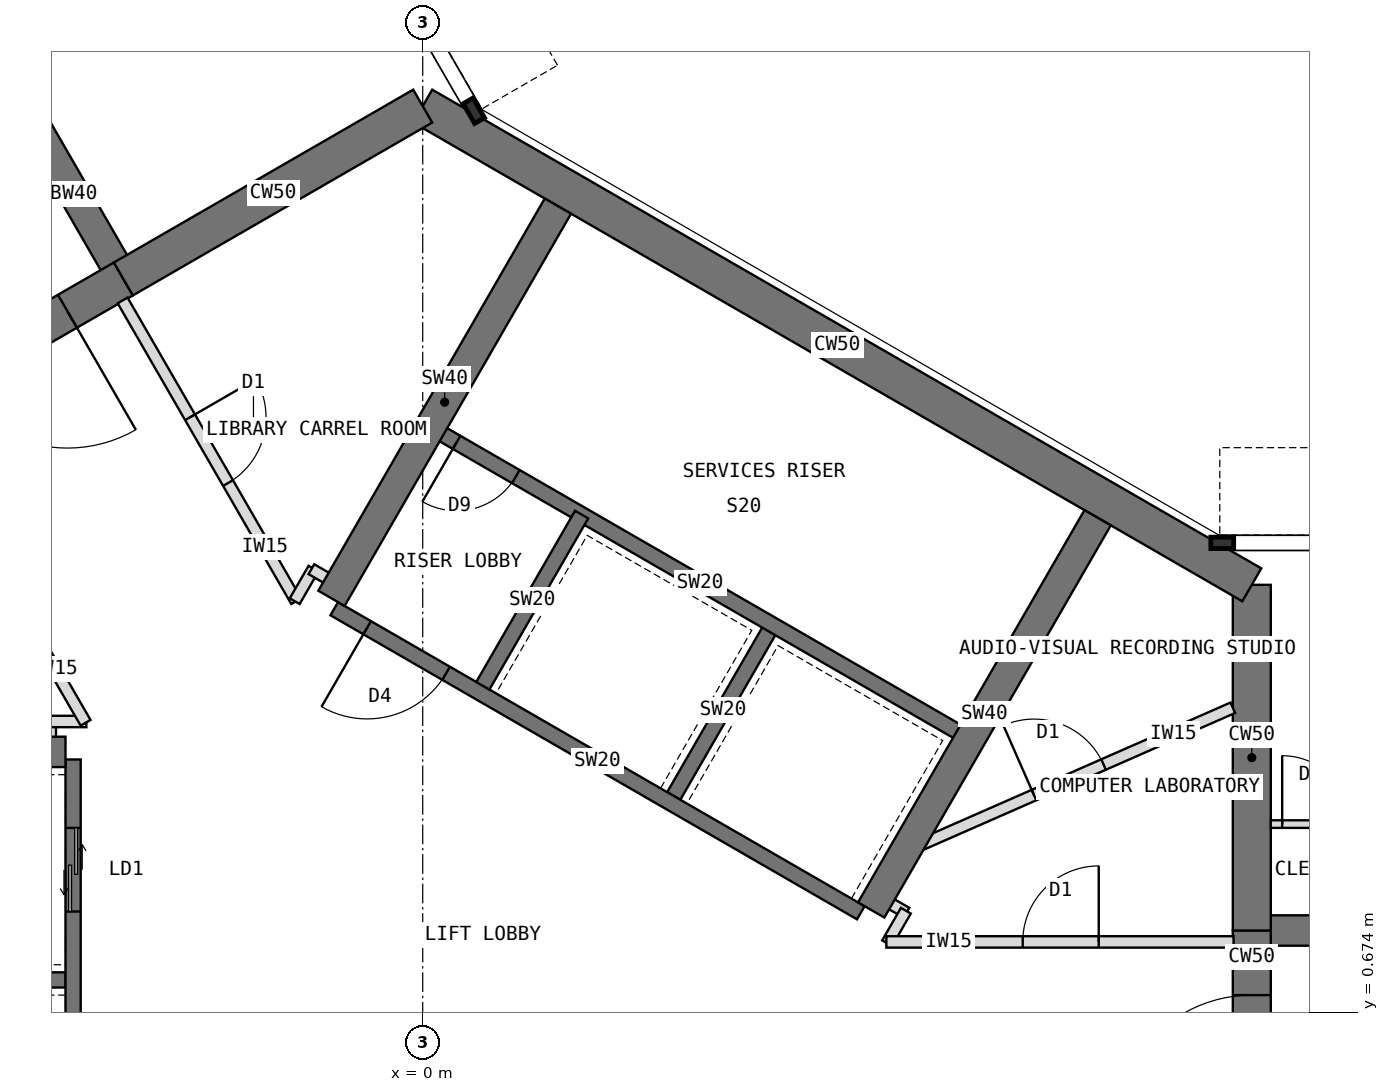
"""IFC4 building model, lengths in metres.
Left out: names, types, materials, properties, quantities, classifications, styles, units other than length and angle.
Written with IfcOpenShell. Run it as: python <this file> out.ifc"""

import sys

from ifc_helpers import new_model, si_unit, direction, frame, frame_2d, origin, place, context, subcontext, project, spatial, rectangle, extrude, element, fill, save


model = new_model("IFC4")
c1 = context("Model", 3, precision=1e-05, world=origin(), true_north=direction((0.0, 1.0)))
c2 = subcontext(c1, "Body", "Model", "MODEL_VIEW")
j1 = project(units=[si_unit("LENGTHUNIT", "METRE"), si_unit("PLANEANGLEUNIT", "RADIAN")], contexts=[c1])
p1 = place(None, origin())
s1 = spatial("IfcSite", under=j1, at=p1, CompositionType="ELEMENT")
p2 = place(p1, origin())
s2 = spatial("IfcBuilding", under=s1, at=p2, CompositionType="ELEMENT")
p3 = place(p2, frame((0.0, 0.0, 218.5)))
s3 = spatial("IfcBuildingStorey", under=s2, at=p3, CompositionType="ELEMENT", Elevation=218.5)
p4 = place(p3, frame((10.908, -1.75, 0.0), z_axis=(0.0, 0.0, 1.0), x_axis=(0.0, 1.0, 0.0)))
e1 = element("IfcWall", 1, at=p4, inside=s3, PredefinedType="SHEAR", context=c2, shape_type="SweptSolid", body=[
    extrude(rectangle(XDim=3.5, YDim=0.5, at=frame_2d((1.75, 0.0))), origin(), (0.0, 0.0, 1.0), 4.0),
])
p5 = place(p4, frame((0.85, 0.0, 0.0)))
e2 = element("IfcOpeningElement", 2, at=p5, cuts=e1, PredefinedType="OPENING", context=c2, shape_type="SweptSolid", body=[
    extrude(rectangle(XDim=1.8, YDim=2.1, at=frame_2d((0.9, 1.05))), frame((0.0, 0.26, 0.0), z_axis=(0.0, -1.0, 0.0), x_axis=(1.0, 0.0, 0.0)), (0.0, 0.0, 1.0), 0.52),
])
p6 = place(p3, frame((10.908, 1.75, 0.0), z_axis=(0.0, 0.0, 1.0), x_axis=(0.0, 1.0, 0.0)))
e3 = element("IfcWall", 3, at=p6, inside=s3, PredefinedType="SHEAR", context=c2, shape_type="SweptSolid", body=[
    extrude(rectangle(XDim=4.548, YDim=0.5, at=frame_2d((2.274, 0.0))), origin(), (0.0, 0.0, 1.0), 4.0),
])
p7 = place(p3, frame((10.908, 6.298, 0.0), z_axis=(0.0, 0.0, 1.0), x_axis=(-0.866021940709, 0.500005998175, 0.0)))
e4 = element("IfcWall", 4, at=p7, inside=s3, PredefinedType="SHEAR", context=c2, shape_type="SweptSolid", body=[
    extrude(rectangle(XDim=12.596, YDim=0.5, at=frame_2d((6.298, 0.0))), origin(), (0.0, 0.0, 1.0), 4.0),
])
p8 = place(p3, frame((0.0, 12.596, 0.0), z_axis=(0.0, 0.0, 1.0), x_axis=(-0.866011268655, -0.500024481964, 0.0)))
e5 = element("IfcWall", 5, at=p8, inside=s3, PredefinedType="SHEAR", context=c2, shape_type="SweptSolid", body=[
    extrude(rectangle(XDim=4.548, YDim=0.5, at=frame_2d((2.274, 0.0))), origin(), (0.0, 0.0, 1.0), 4.0),
])
p9 = place(p3, frame((-3.939, 10.322, 0.0), z_axis=(0.0, 0.0, 1.0), x_axis=(-0.866019471182, -0.500010275428, 0.0)))
e6 = element("IfcWall", 6, at=p9, inside=s3, PredefinedType="SHEAR", context=c2, shape_type="SweptSolid", body=[
    extrude(rectangle(XDim=3.5, YDim=0.5, at=frame_2d((1.75, 0.0))), origin(), (0.0, 0.0, 1.0), 4.0),
])
p10 = place(p9, frame((0.85, 0.0, 0.0)))
e7 = element("IfcOpeningElement", 7, at=p10, cuts=e6, PredefinedType="OPENING", context=c2, shape_type="SweptSolid", body=[
    extrude(rectangle(XDim=1.8, YDim=2.1, at=frame_2d((0.9, 1.05))), frame((0.0, 0.26, 0.0), z_axis=(0.0, -1.0, 0.0), x_axis=(1.0, 0.0, 0.0)), (0.0, 0.0, 1.0), 0.52),
])
p11 = place(p3, frame((10.908, 1.75, 0.0), z_axis=(0.0, 0.0, 1.0), x_axis=(1.0, 0.0, 0.0)))
e8 = element("IfcWall", 8, at=p11, inside=s3, PredefinedType="SHEAR", context=c2, shape_type="SweptSolid", body=[
    extrude(rectangle(XDim=2.592, YDim=0.4, at=frame_2d((1.296, 0.0))), origin(), (0.0, 0.0, 1.0), 4.0),
])
p12 = place(p3, frame((-3.939, 10.322, 0.0), z_axis=(0.0, 0.0, 1.0), x_axis=(-0.499918158782, 0.866072649678, 0.0)))
e9 = element("IfcWall", 9, at=p12, inside=s3, PredefinedType="SHEAR", context=c2, shape_type="SweptSolid", body=[
    extrude(rectangle(XDim=2.592, YDim=0.4, at=frame_2d((1.296, 0.0))), origin(), (0.0, 0.0, 1.0), 4.0),
])
p13 = place(p3, frame((5.764, 1.984, 0.0), z_axis=(0.0, 0.0, 1.0), x_axis=(-0.866026010844, 0.49999894854, 0.0)))
e10 = element("IfcWall", 10, at=p13, inside=s3, PredefinedType="SHEAR", context=c2, shape_type="SweptSolid", body=[
    extrude(rectangle(XDim=8.0, YDim=0.2, at=frame_2d((4.0, 0.0))), origin(), (0.0, 0.0, 1.0), 4.0),
])
p14 = place(p13, frame((6.3, 0.0, 0.0)))
e11 = element("IfcOpeningElement", 11, at=p14, cuts=e10, PredefinedType="OPENING", context=c2, shape_type="SweptSolid", body=[
    extrude(rectangle(XDim=1.2, YDim=2.1, at=frame_2d((0.6, 1.05))), frame((0.0, 0.11, 0.0), z_axis=(0.0, -1.0, 0.0), x_axis=(1.0, 0.0, 0.0)), (0.0, 0.0, 1.0), 0.22),
])
for number, where, z_axis, x_axis in (
    (12, (3.303, 3.52, 0.0), (0.0, 0.0, 1.0), (0.5, 0.866, 0.0)),
    (13, (0.791, 4.97, 0.0), (0.0, 0.0, 1.0), (0.5, 0.866, 0.0)),
):
    element("IfcWall", number, at=place(p3, frame(where, z_axis=z_axis, x_axis=x_axis)), inside=s3, PredefinedType="SHEAR", context=c2, shape_type="SweptSolid", body=[
        extrude(rectangle(XDim=2.6, YDim=0.2, at=frame_2d((1.3, 0.0))), origin(), (0.0, 0.0, 1.0), 4.0),
    ])
p15 = place(p3, frame((7.114, 4.322, 0.0), z_axis=(0.0, 0.0, 1.0), x_axis=(-0.866026010844, 0.49999894854, 0.0)))
e14 = element("IfcWall", 14, at=p15, inside=s3, PredefinedType="SHEAR", context=c2, shape_type="SweptSolid", body=[
    extrude(rectangle(XDim=8.0, YDim=0.2, at=frame_2d((4.0, 0.0))), origin(), (0.0, 0.0, 1.0), 4.0),
])
p16 = place(p15, frame((6.8, 0.0, 0.0)))
e15 = element("IfcOpeningElement", 15, at=p16, cuts=e14, PredefinedType="OPENING", context=c2, shape_type="SweptSolid", body=[
    extrude(rectangle(XDim=0.9, YDim=2.1, at=frame_2d((0.45, 1.05))), frame((0.0, 0.11, 0.0), z_axis=(0.0, -1.0, 0.0), x_axis=(1.0, 0.0, 0.0)), (0.0, 0.0, 1.0), 0.22),
])
p17 = place(p3, frame((-1.201, 6.12, 0.0), z_axis=(0.0, 0.0, 1.0), x_axis=(0.500021575205, 0.866012946976, 0.0)))
e16 = element("IfcWall", 16, at=p17, inside=s3, PredefinedType="SHEAR", context=c2, shape_type="SweptSolid", body=[
    extrude(rectangle(XDim=5.958, YDim=0.4, at=frame_2d((2.979, 0.0))), origin(), (0.0, 0.0, 1.0), 4.0),
])
p18 = place(p3, frame((5.901, 2.02, 0.0), z_axis=(0.0, 0.0, 1.0), x_axis=(0.500003832394, 0.86602319114, 0.0)))
e17 = element("IfcWall", 17, at=p18, inside=s3, PredefinedType="SHEAR", context=c2, shape_type="SweptSolid", body=[
    extrude(rectangle(XDim=5.958, YDim=0.4, at=frame_2d((2.979, 0.0))), origin(), (0.0, 0.0, 1.0), 4.0),
])
p19 = place(p3, frame((-4.6, 4.0, 0.0), z_axis=(0.0, 0.0, 1.0), x_axis=(0.0, -1.0, 0.0)))
e18 = element("IfcWall", 18, at=p19, inside=s3, PredefinedType="SHEAR", context=c2, shape_type="SweptSolid", body=[
    extrude(rectangle(XDim=8.0, YDim=0.2, at=frame_2d((4.0, 0.0))), origin(), (0.0, 0.0, 1.0), 4.0),
])
p20 = place(p19, frame((6.3, 0.0, 0.0)))
e19 = element("IfcOpeningElement", 19, at=p20, cuts=e18, PredefinedType="OPENING", context=c2, shape_type="SweptSolid", body=[
    extrude(rectangle(XDim=1.2, YDim=2.1, at=frame_2d((0.6, 1.05))), frame((0.0, 0.11, 0.0), z_axis=(0.0, -1.0, 0.0), x_axis=(1.0, 0.0, 0.0)), (0.0, 0.0, 1.0), 0.22),
])
p21 = place(p19, frame((0.9, 0.0, 0.0)))
e20 = element("IfcOpeningElement", 20, at=p21, cuts=e18, PredefinedType="OPENING", context=c2, shape_type="SweptSolid", body=[
    extrude(rectangle(XDim=1.1, YDim=2.2, at=frame_2d((0.55, 1.1))), frame((0.0, 0.11, 0.0), z_axis=(0.0, -1.0, 0.0), x_axis=(1.0, 0.0, 0.0)), (0.0, 0.0, 1.0), 0.22),
])
p22 = place(p3, frame((-4.7, 1.1, 0.0), z_axis=(0.0, 0.0, 1.0), x_axis=(-1.0, 0.0, 0.0)))
e21 = element("IfcWall", 21, at=p22, inside=s3, PredefinedType="SHEAR", context=c2, shape_type="SweptSolid", body=[
    extrude(rectangle(XDim=2.6, YDim=0.2, at=frame_2d((1.3, 0.0))), origin(), (0.0, 0.0, 1.0), 4.0),
])
p23 = place(p3, frame((-4.7, 4.1, 0.0), z_axis=(0.0, 0.0, 1.0), x_axis=(-1.0, 0.0, 0.0)))
e22 = element("IfcWall", 22, at=p23, inside=s3, PredefinedType="SHEAR", context=c2, shape_type="SweptSolid", body=[
    extrude(rectangle(XDim=5.958, YDim=0.4, at=frame_2d((2.979, 0.0))), origin(), (0.0, 0.0, 1.0), 4.0),
])
p24 = place(p3, frame((11.158, 3.15, 0.0), z_axis=(0.0, 0.0, 1.0), x_axis=(1.0, 0.0, 0.0)))
e23 = element("IfcWall", 23, at=p24, inside=s3, PredefinedType="PARTITIONING", context=c2, shape_type="SweptSolid", body=[
    extrude(rectangle(XDim=2.4, YDim=0.1, at=frame_2d((1.2, 0.0))), origin(), (0.0, 0.0, 1.0), 3.8),
])
p25 = place(p24, frame((0.15, 0.0, 0.0)))
e24 = element("IfcOpeningElement", 24, at=p25, cuts=e23, PredefinedType="OPENING", context=c2, shape_type="SweptSolid", body=[
    extrude(rectangle(XDim=0.9, YDim=2.1, at=frame_2d((0.45, 1.05))), frame((0.0, 0.06, 0.0), z_axis=(0.0, -1.0, 0.0), x_axis=(1.0, 0.0, 0.0)), (0.0, 0.0, 1.0), 0.12),
])
p26 = place(p3, frame((-4.9, 4.09, 0.0), z_axis=(0.0, 0.0, 1.0), x_axis=(0.0, 1.0, 0.0)))
e25 = element("IfcWall", 25, at=p26, inside=s3, PredefinedType="PARTITIONING", context=c2, shape_type="SweptSolid", body=[
    extrude(rectangle(XDim=0.43, YDim=0.15, at=frame_2d((0.215, 0.0))), origin(), (0.0, 0.0, 1.0), 3.8),
])
p27 = place(p3, frame((-4.92, 4.5, 0.0), z_axis=(0.0, 0.0, 1.0), x_axis=(1.0, 0.0, 0.0)))
e26 = element("IfcWall", 26, at=p27, inside=s3, PredefinedType="PARTITIONING", context=c2, shape_type="SweptSolid", body=[
    extrude(rectangle(XDim=0.494, YDim=0.15, at=frame_2d((0.247, 0.0))), origin(), (0.0, 0.0, 1.0), 3.8),
])
p28 = place(p3, frame((-4.436, 4.483, 0.0), z_axis=(0.0, 0.0, 1.0), x_axis=(-0.500001558674, 0.866024503882, 0.0)))
e27 = element("IfcWall", 27, at=p28, inside=s3, PredefinedType="PARTITIONING", context=c2, shape_type="SweptSolid", body=[
    extrude(rectangle(XDim=4.568, YDim=0.15, at=frame_2d((2.284, 0.0))), origin(), (0.0, 0.0, 1.0), 3.8),
])
p29 = place(p28, frame((1.794, 0.0, 0.0)))
e28 = element("IfcOpeningElement", 28, at=p29, cuts=e27, PredefinedType="OPENING", context=c2, shape_type="SweptSolid", body=[
    extrude(rectangle(XDim=1.0, YDim=2.1, at=frame_2d((0.5, 1.05))), frame((0.0, 0.085, 0.0), z_axis=(0.0, -1.0, 0.0), x_axis=(1.0, 0.0, 0.0)), (0.0, 0.0, 1.0), 0.17),
])
p30 = place(p3, frame((-3.948, 10.039, 0.0), z_axis=(0.0, 0.0, 1.0), x_axis=(0.500001558674, -0.866024503882, 0.0)))
e29 = element("IfcWall", 29, at=p30, inside=s3, PredefinedType="PARTITIONING", context=c2, shape_type="SweptSolid", body=[
    extrude(rectangle(XDim=4.568, YDim=0.15, at=frame_2d((2.284, 0.0))), origin(), (0.0, 0.0, 1.0), 3.8),
])
p31 = place(p30, frame((1.774, 0.0, 0.0)))
e30 = element("IfcOpeningElement", 30, at=p31, cuts=e29, PredefinedType="OPENING", context=c2, shape_type="SweptSolid", body=[
    extrude(rectangle(XDim=1.0, YDim=2.1, at=frame_2d((0.5, 1.05))), frame((0.0, 0.085, 0.0), z_axis=(0.0, -1.0, 0.0), x_axis=(1.0, 0.0, 0.0)), (0.0, 0.0, 1.0), 0.17),
])
p32 = place(p3, frame((-1.684, 6.083, 0.0), z_axis=(0.0, 0.0, 1.0), x_axis=(0.50033519877, 0.865831790172, 0.0)))
e31 = element("IfcWall", 31, at=p32, inside=s3, PredefinedType="PARTITIONING", context=c2, shape_type="SweptSolid", body=[
    extrude(rectangle(XDim=0.494, YDim=0.15, at=frame_2d((0.247, 0.0))), origin(), (0.0, 0.0, 1.0), 3.8),
])
for number, where, z_axis, x_axis in (
    (32, (-1.464, 6.503, 0.0), (0.0, 0.0, 1.0), (0.866, -0.5, 0.0)),
    (33, (5.992, 2.198, 0.0), (0.0, 0.0, 1.0), (0.866, -0.5, 0.0)),
):
    element("IfcWall", number, at=place(p3, frame(where, z_axis=z_axis, x_axis=x_axis)), inside=s3, PredefinedType="PARTITIONING", context=c2, shape_type="SweptSolid", body=[
        extrude(rectangle(XDim=0.43, YDim=0.15, at=frame_2d((0.215, 0.0))), origin(), (0.0, 0.0, 1.0), 3.8),
    ])
p33 = place(p3, frame((6.357, 2.011, 0.0), z_axis=(0.0, 0.0, 1.0), x_axis=(-0.50033519877, -0.865831790172, 0.0)))
e34 = element("IfcWall", 34, at=p33, inside=s3, PredefinedType="PARTITIONING", context=c2, shape_type="SweptSolid", body=[
    extrude(rectangle(XDim=0.494, YDim=0.15, at=frame_2d((0.247, 0.0))), origin(), (0.0, 0.0, 1.0), 3.8),
])
p34 = place(p3, frame((6.1, 1.6, 0.0), z_axis=(0.0, 0.0, 1.0), x_axis=(1.0, 0.0, 0.0)))
e35 = element("IfcWall", 35, at=p34, inside=s3, PredefinedType="PARTITIONING", context=c2, shape_type="SweptSolid", body=[
    extrude(rectangle(XDim=4.568, YDim=0.15, at=frame_2d((2.284, 0.0))), origin(), (0.0, 0.0, 1.0), 3.8),
])
p35 = place(p34, frame((1.794, 0.0, 0.0)))
e36 = element("IfcOpeningElement", 36, at=p35, cuts=e35, PredefinedType="OPENING", context=c2, shape_type="SweptSolid", body=[
    extrude(rectangle(XDim=1.0, YDim=2.1, at=frame_2d((0.5, 1.05))), frame((0.0, 0.085, 0.0), z_axis=(0.0, -1.0, 0.0), x_axis=(1.0, 0.0, 0.0)), (0.0, 0.0, 1.0), 0.17),
])
p36 = place(p3, frame((6.342, 2.785, 0.0), z_axis=(0.0, 0.0, 1.0), x_axis=(0.915607292951, 0.402073730919, 0.0)))
e37 = element("IfcWall", 37, at=p36, inside=s3, PredefinedType="PARTITIONING", context=c2, shape_type="SweptSolid", body=[
    extrude(rectangle(XDim=4.714, YDim=0.15, at=frame_2d((2.357, 0.0))), origin(), (0.0, 0.0, 1.0), 3.8),
])
p37 = place(p36, frame((1.857, 0.0, 0.0)))
e38 = element("IfcOpeningElement", 38, at=p37, cuts=e37, PredefinedType="OPENING", context=c2, shape_type="SweptSolid", body=[
    extrude(rectangle(XDim=1.0, YDim=2.1, at=frame_2d((0.5, 1.05))), frame((0.0, 0.085, 0.0), z_axis=(0.0, -1.0, 0.0), x_axis=(1.0, 0.0, 0.0)), (0.0, 0.0, 1.0), 0.17),
])
p38 = place(p14, origin())
e39 = element("IfcDoor", 39, at=p38, inside=s3, OperationType="SINGLE_SWING_RIGHT", PredefinedType="DOOR", context=c2, shape_type="SweptSolid", body=[
    extrude(rectangle(XDim=1.2, YDim=2.1, at=frame_2d((0.6, 1.05))), frame((0.0, 0.025, 0.0), z_axis=(0.0, -1.0, 0.0), x_axis=(1.0, 0.0, 0.0)), (0.0, 0.0, 1.0), 0.05),
])
fill(e11, e39)
p39 = place(p16, origin())
e40 = element("IfcDoor", 40, at=p39, inside=s3, OperationType="SINGLE_SWING_RIGHT", PredefinedType="DOOR", context=c2, shape_type="SweptSolid", body=[
    extrude(rectangle(XDim=0.9, YDim=2.1, at=frame_2d((0.45, 1.05))), frame((0.0, 0.025, 0.0), z_axis=(0.0, -1.0, 0.0), x_axis=(1.0, 0.0, 0.0)), (0.0, 0.0, 1.0), 0.05),
])
fill(e15, e40)
p40 = place(p21, origin())
e41 = element("IfcDoor", 41, at=p40, inside=s3, OperationType="DOUBLE_DOOR_SLIDING", PredefinedType="DOOR", context=c2, shape_type="SweptSolid", body=[
    extrude(rectangle(XDim=1.1, YDim=2.2, at=frame_2d((0.55, 1.1))), frame((0.0, 0.025, 0.0), z_axis=(0.0, -1.0, 0.0), x_axis=(1.0, 0.0, 0.0)), (0.0, 0.0, 1.0), 0.05),
])
fill(e20, e41)
p41 = place(p5, origin())
e42 = element("IfcDoor", 42, at=p41, inside=s3, OperationType="DOUBLE_DOOR_DOUBLE_SWING", PredefinedType="DOOR", context=c2, shape_type="SweptSolid", body=[
    extrude(rectangle(XDim=1.8, YDim=2.1, at=frame_2d((0.9, 1.05))), frame((0.0, 0.025, 0.0), z_axis=(0.0, -1.0, 0.0), x_axis=(1.0, 0.0, 0.0)), (0.0, 0.0, 1.0), 0.05),
])
fill(e2, e42)
p42 = place(p10, origin())
e43 = element("IfcDoor", 43, at=p42, inside=s3, OperationType="DOUBLE_DOOR_DOUBLE_SWING", PredefinedType="DOOR", context=c2, shape_type="SweptSolid", body=[
    extrude(rectangle(XDim=1.8, YDim=2.1, at=frame_2d((0.9, 1.05))), frame((0.0, 0.025, 0.0), z_axis=(0.0, -1.0, 0.0), x_axis=(1.0, 0.0, 0.0)), (0.0, 0.0, 1.0), 0.05),
])
fill(e7, e43)
p43 = place(p25, origin())
e44 = element("IfcDoor", 44, at=p43, inside=s3, OperationType="SINGLE_SWING_LEFT", PredefinedType="DOOR", context=c2, shape_type="SweptSolid", body=[
    extrude(rectangle(XDim=0.9, YDim=2.1, at=frame_2d((0.45, 1.05))), frame((0.0, 0.025, 0.0), z_axis=(0.0, -1.0, 0.0), x_axis=(1.0, 0.0, 0.0)), (0.0, 0.0, 1.0), 0.05),
])
fill(e24, e44)
p44 = place(p35, origin())
e45 = element("IfcDoor", 45, at=p44, inside=s3, OperationType="SINGLE_SWING_RIGHT", PredefinedType="DOOR", context=c2, shape_type="SweptSolid", body=[
    extrude(rectangle(XDim=1.0, YDim=2.1, at=frame_2d((0.5, 1.05))), frame((0.0, 0.025, 0.0), z_axis=(0.0, -1.0, 0.0), x_axis=(1.0, 0.0, 0.0)), (0.0, 0.0, 1.0), 0.05),
])
fill(e36, e45)
p45 = place(p37, origin())
e46 = element("IfcDoor", 46, at=p45, inside=s3, OperationType="SINGLE_SWING_LEFT", PredefinedType="DOOR", context=c2, shape_type="SweptSolid", body=[
    extrude(rectangle(XDim=1.0, YDim=2.1, at=frame_2d((0.5, 1.05))), frame((0.0, 0.025, 0.0), z_axis=(0.0, -1.0, 0.0), x_axis=(1.0, 0.0, 0.0)), (0.0, 0.0, 1.0), 0.05),
])
fill(e38, e46)
p46 = place(p31, origin())
e47 = element("IfcDoor", 47, at=p46, inside=s3, OperationType="SINGLE_SWING_LEFT", PredefinedType="DOOR", context=c2, shape_type="SweptSolid", body=[
    extrude(rectangle(XDim=1.0, YDim=2.1, at=frame_2d((0.5, 1.05))), frame((0.0, 0.025, 0.0), z_axis=(0.0, -1.0, 0.0), x_axis=(1.0, 0.0, 0.0)), (0.0, 0.0, 1.0), 0.05),
])
fill(e30, e47)
save(model, sys.argv[1])
